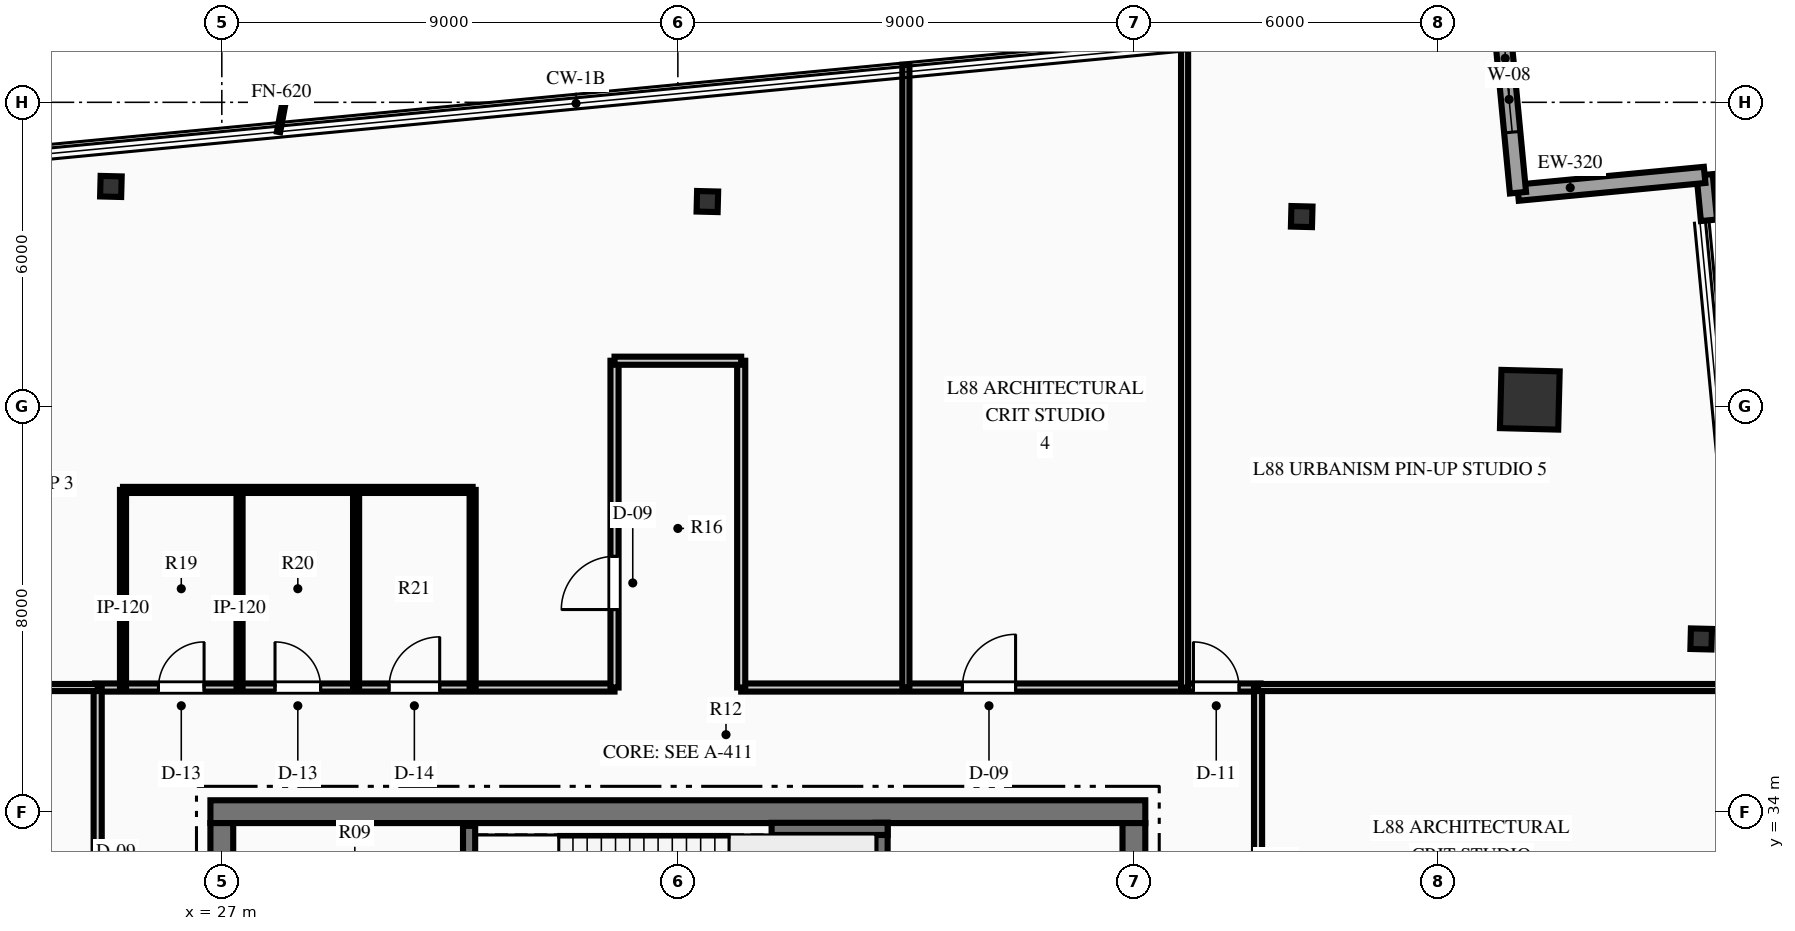
"""IFC4 building model, lengths in metres.
Left out: names, types, materials, properties, quantities, classifications, styles, units other than length and angle.
Written with IfcOpenShell. Run it as: python <this file> out.ifc"""

import sys

from ifc_helpers import new_model, si_unit, direction, frame, frame_2d, origin, origin_2d, place, context, subcontext, project, spatial, rectangle, hollow_rectangle, i_section, extrude, element, fill, save


model = new_model("IFC4")
c1 = context("Model", 3, precision=1e-05, world=origin(), true_north=direction((0.0, 1.0)))
c2 = subcontext(c1, "Body", "Model", "MODEL_VIEW")
j1 = project(units=[si_unit("LENGTHUNIT", "METRE"), si_unit("PLANEANGLEUNIT", "RADIAN")], contexts=[c1])
p1 = place(None, origin())
s1 = spatial("IfcSite", under=j1, at=p1, CompositionType="ELEMENT")
p2 = place(p1, origin())
s2 = spatial("IfcBuilding", under=s1, at=p2, CompositionType="ELEMENT")
p3 = place(p2, frame((0.0, 0.0, 347.7)))
s3 = spatial("IfcBuildingStorey", under=s2, at=p3, CompositionType="ELEMENT", Elevation=347.7)
p4 = place(p3, frame((26.775, 34.0, 0.0), z_axis=(0.0, 0.0, 1.0), x_axis=(1.0, 0.0, 0.0)))
e1 = element("IfcWall", 1, at=p4, inside=s3, PredefinedType="SHEAR", context=c2, shape_type="SweptSolid", body=[
    extrude(rectangle(XDim=18.45, YDim=0.45, at=frame_2d((9.225, 0.0))), origin(), (0.0, 0.0, 1.0), 4.5),
])
p5 = place(p3, frame((27.0, 18.225, 0.0), z_axis=(0.0, 0.0, 1.0), x_axis=(0.0, 1.0, 0.0)))
e2 = element("IfcWall", 2, at=p5, inside=s3, PredefinedType="SHEAR", context=c2, shape_type="SweptSolid", body=[
    extrude(rectangle(XDim=15.55, YDim=0.45, at=frame_2d((7.775, 0.0))), origin(), (0.0, 0.0, 1.0), 4.5),
])
p6 = place(p5, frame((10.015, 0.0, 0.0)))
e3 = element("IfcOpeningElement", 3, at=p6, cuts=e2, PredefinedType="OPENING", context=c2, shape_type="SweptSolid", body=[
    extrude(rectangle(XDim=1.4, YDim=2.2, at=frame_2d((0.7, 1.1))), frame((0.0, 0.235, 0.0), z_axis=(0.0, -1.0, 0.0), x_axis=(1.0, 0.0, 0.0)), (0.0, 0.0, 1.0), 0.47),
])
p7 = place(p3, frame((45.0, 18.225, 0.0), z_axis=(0.0, 0.0, 1.0), x_axis=(0.0, 1.0, 0.0)))
e4 = element("IfcWall", 4, at=p7, inside=s3, PredefinedType="SHEAR", context=c2, shape_type="SweptSolid", body=[
    extrude(rectangle(XDim=15.55, YDim=0.45, at=frame_2d((7.775, 0.0))), origin(), (0.0, 0.0, 1.0), 4.5),
])
p8 = place(p7, frame((10.015, 0.0, 0.0)))
e5 = element("IfcOpeningElement", 5, at=p8, cuts=e4, PredefinedType="OPENING", context=c2, shape_type="SweptSolid", body=[
    extrude(rectangle(XDim=1.4, YDim=2.2, at=frame_2d((0.7, 1.1))), frame((0.0, 0.235, 0.0), z_axis=(0.0, -1.0, 0.0), x_axis=(1.0, 0.0, 0.0)), (0.0, 0.0, 1.0), 0.47),
])
p9 = place(p3, frame((31.88, 29.93, 0.0), z_axis=(0.0, 0.0, 1.0), x_axis=(0.0, 1.0, 0.0)))
e6 = element("IfcWall", 6, at=p9, inside=s3, PredefinedType="SHEAR", context=c2, shape_type="SweptSolid", body=[
    extrude(rectangle(XDim=3.79, YDim=0.24, at=frame_2d((1.895, 0.0))), origin(), (0.0, 0.0, 1.0), 4.5),
])
p10 = place(p3, frame((40.02, 29.93, 0.0), z_axis=(0.0, 0.0, 1.0), x_axis=(0.0, 1.0, 0.0)))
e7 = element("IfcWall", 7, at=p10, inside=s3, PredefinedType="SHEAR", context=c2, shape_type="SweptSolid", body=[
    extrude(rectangle(XDim=3.85, YDim=0.24, at=frame_2d((1.925, 0.0))), origin(), (0.0, 0.0, 1.0), 4.5),
])
p11 = place(p3, frame((37.85, 33.66, 0.0), z_axis=(0.0, 0.0, 1.0), x_axis=(1.0, 0.0, 0.0)))
e8 = element("IfcWall", 8, at=p11, inside=s3, PredefinedType="SHEAR", context=c2, shape_type="SweptSolid", body=[
    extrude(rectangle(XDim=2.29, YDim=0.24, at=frame_2d((1.145, 0.0))), origin(), (0.0, 0.0, 1.0), 4.5),
])
p12 = place(p3, frame((52.813, 42.13, 0.0), z_axis=(0.0, 0.0, 1.0), x_axis=(0.025304572866, 0.999679788028, 0.0)))
e9 = element("IfcColumn", 9, at=p12, inside=s3, PredefinedType="COLUMN", context=c2, shape_type="SweptSolid", body=[
    extrude(hollow_rectangle(XDim=1.15, YDim=1.15, WallThickness=0.05, at=origin_2d()), origin(), (0.0, 0.0, 1.0), 4.5),
])
for number, where, z_axis, x_axis in (
    (10, (56.195, 37.409, 0.0), (0.0, 0.0, 1.0), (0.025, 1.0, 0.0)),
    (11, (48.312, 45.745, 0.0), (0.0, 0.0, 1.0), (0.025, 1.0, 0.0)),
    (12, (36.582, 46.042, 0.0), (0.0, 0.0, 1.0), (0.025, 1.0, 0.0)),
    (13, (24.811, 46.34, 0.0), (0.0, 0.0, 1.0), (0.025, 1.0, 0.0)),
):
    element("IfcColumn", number, at=place(p3, frame(where, z_axis=z_axis, x_axis=x_axis)), inside=s3, PredefinedType="COLUMN", context=c2, shape_type="SweptSolid", body=[
        extrude(i_section(OverallWidth=0.406, OverallDepth=0.416, WebThickness=0.03, FlangeThickness=0.048, at=origin_2d()), origin(), (0.0, 0.0, 1.0), 4.5),
    ])
p13 = place(p3, frame((56.263, 46.567, 0.0), z_axis=(0.0, 0.0, 1.0), x_axis=(0.094962739077, -0.995480827634, 0.0)))
e14 = element("IfcWall", 14, at=p13, inside=s3, PredefinedType="STANDARD", context=c2, shape_type="SweptSolid", body=[
    extrude(rectangle(XDim=0.9, YDim=0.32, at=frame_2d((0.45, 0.0))), origin(), (0.0, 0.0, 1.0), 4.1),
])
p14 = place(p3, frame((52.58, 46.216, 0.0), z_axis=(0.0, 0.0, 1.0), x_axis=(0.995482117902, 0.094949212412, 0.0)))
e15 = element("IfcWall", 15, at=p14, inside=s3, PredefinedType="STANDARD", context=c2, shape_type="SweptSolid", body=[
    extrude(rectangle(XDim=3.7, YDim=0.32, at=frame_2d((1.85, 0.0))), origin(), (0.0, 0.0, 1.0), 4.1),
])
p15 = place(p3, frame((52.229, 49.899, 0.0), z_axis=(0.0, 0.0, 1.0), x_axis=(0.094949212412, -0.995482117902, 0.0)))
e16 = element("IfcWall", 16, at=p15, inside=s3, PredefinedType="STANDARD", context=c2, shape_type="SweptSolid", body=[
    extrude(rectangle(XDim=3.7, YDim=0.32, at=frame_2d((1.85, 0.0))), origin(), (0.0, 0.0, 1.0), 4.1),
])
p16 = place(p15, frame((1.2, 0.0, 0.85)))
e17 = element("IfcOpeningElement", 17, at=p16, cuts=e16, PredefinedType="OPENING", context=c2, shape_type="SweptSolid", body=[
    extrude(rectangle(XDim=1.3, YDim=1.9, at=frame_2d((0.65, 0.95))), frame((0.0, 0.17, 0.0), z_axis=(0.0, -1.0, 0.0), x_axis=(1.0, 0.0, 0.0)), (0.0, 0.0, 1.0), 0.34),
])
p17 = place(p3, frame((24.5, 36.45, 0.0), z_axis=(0.0, 0.0, 1.0), x_axis=(1.0, 0.0, 0.0)))
e18 = element("IfcWall", 18, at=p17, inside=s3, PredefinedType="PARTITIONING", context=c2, shape_type="SweptSolid", body=[
    extrude(rectangle(XDim=10.25, YDim=0.16, at=frame_2d((5.125, 0.0))), origin(), (0.0, 0.0, 1.0), 4.1),
])
p18 = place(p17, frame((1.25, 0.0, 0.0)))
e19 = element("IfcOpeningElement", 19, at=p18, cuts=e18, PredefinedType="OPENING", context=c2, shape_type="SweptSolid", body=[
    extrude(rectangle(XDim=0.9, YDim=2.15, at=frame_2d((0.45, 1.075))), frame((0.0, 0.09, 0.0), z_axis=(0.0, -1.0, 0.0), x_axis=(1.0, 0.0, 0.0)), (0.0, 0.0, 1.0), 0.18),
])
p19 = place(p17, frame((3.55, 0.0, 0.0)))
e20 = element("IfcOpeningElement", 20, at=p19, cuts=e18, PredefinedType="OPENING", context=c2, shape_type="SweptSolid", body=[
    extrude(rectangle(XDim=0.9, YDim=2.15, at=frame_2d((0.45, 1.075))), frame((0.0, 0.09, 0.0), z_axis=(0.0, -1.0, 0.0), x_axis=(1.0, 0.0, 0.0)), (0.0, 0.0, 1.0), 0.18),
])
p20 = place(p17, frame((5.8, 0.0, 0.0)))
e21 = element("IfcOpeningElement", 21, at=p20, cuts=e18, PredefinedType="OPENING", context=c2, shape_type="SweptSolid", body=[
    extrude(rectangle(XDim=1.0, YDim=2.15, at=frame_2d((0.5, 1.075))), frame((0.0, 0.09, 0.0), z_axis=(0.0, -1.0, 0.0), x_axis=(1.0, 0.0, 0.0)), (0.0, 0.0, 1.0), 0.18),
])
p21 = place(p3, frame((37.25, 36.45, 0.0), z_axis=(0.0, 0.0, 1.0), x_axis=(1.0, 0.0, 0.0)))
e22 = element("IfcWall", 22, at=p21, inside=s3, PredefinedType="PARTITIONING", context=c2, shape_type="SweptSolid", body=[
    extrude(rectangle(XDim=10.25, YDim=0.16, at=frame_2d((5.125, 0.0))), origin(), (0.0, 0.0, 1.0), 4.1),
])
p22 = place(p21, frame((4.365, 0.0, 0.0)))
e23 = element("IfcOpeningElement", 23, at=p22, cuts=e22, PredefinedType="OPENING", context=c2, shape_type="SweptSolid", body=[
    extrude(rectangle(XDim=1.05, YDim=2.15, at=frame_2d((0.525, 1.075))), frame((0.0, 0.09, 0.0), z_axis=(0.0, -1.0, 0.0), x_axis=(1.0, 0.0, 0.0)), (0.0, 0.0, 1.0), 0.18),
])
p23 = place(p21, frame((8.925, 0.0, 0.0)))
e24 = element("IfcOpeningElement", 24, at=p23, cuts=e22, PredefinedType="OPENING", context=c2, shape_type="SweptSolid", body=[
    extrude(rectangle(XDim=0.9, YDim=2.15, at=frame_2d((0.45, 1.075))), frame((0.0, 0.09, 0.0), z_axis=(0.0, -1.0, 0.0), x_axis=(1.0, 0.0, 0.0)), (0.0, 0.0, 1.0), 0.18),
])
p24 = place(p3, frame((24.55, 27.25, 0.0), z_axis=(0.0, 0.0, 1.0), x_axis=(0.0, 1.0, 0.0)))
e25 = element("IfcWall", 25, at=p24, inside=s3, PredefinedType="PARTITIONING", context=c2, shape_type="SweptSolid", body=[
    extrude(rectangle(XDim=9.2, YDim=0.16, at=frame_2d((4.6, 0.0))), origin(), (0.0, 0.0, 1.0), 4.1),
])
p25 = place(p24, frame((4.075, 0.0, 0.0)))
e26 = element("IfcOpeningElement", 26, at=p25, cuts=e25, PredefinedType="OPENING", context=c2, shape_type="SweptSolid", body=[
    extrude(rectangle(XDim=1.05, YDim=2.15, at=frame_2d((0.525, 1.075))), frame((0.0, 0.09, 0.0), z_axis=(0.0, -1.0, 0.0), x_axis=(1.0, 0.0, 0.0)), (0.0, 0.0, 1.0), 0.18),
])
p26 = place(p3, frame((47.45, 27.25, 0.0), z_axis=(0.0, 0.0, 1.0), x_axis=(0.0, 1.0, 0.0)))
e27 = element("IfcWall", 27, at=p26, inside=s3, PredefinedType="PARTITIONING", context=c2, shape_type="SweptSolid", body=[
    extrude(rectangle(XDim=9.2, YDim=0.16, at=frame_2d((4.6, 0.0))), origin(), (0.0, 0.0, 1.0), 4.1),
])
p27 = place(p26, frame((3.927, 0.0, 0.0)))
e28 = element("IfcOpeningElement", 28, at=p27, cuts=e27, PredefinedType="OPENING", context=c2, shape_type="SweptSolid", body=[
    extrude(rectangle(XDim=1.05, YDim=2.15, at=frame_2d((0.525, 1.075))), frame((0.0, 0.09, 0.0), z_axis=(0.0, -1.0, 0.0), x_axis=(1.0, 0.0, 0.0)), (0.0, 0.0, 1.0), 0.18),
])
p28 = place(p3, frame((34.75, 36.45, 0.0), z_axis=(0.0, 0.0, 1.0), x_axis=(0.0, 1.0, 0.0)))
e29 = element("IfcWall", 29, at=p28, inside=s3, PredefinedType="PARTITIONING", context=c2, shape_type="SweptSolid", body=[
    extrude(rectangle(XDim=6.45, YDim=0.16, at=frame_2d((3.225, 0.0))), origin(), (0.0, 0.0, 1.0), 4.1),
])
p29 = place(p28, frame((1.539, 0.0, 0.0)))
e30 = element("IfcOpeningElement", 30, at=p29, cuts=e29, PredefinedType="OPENING", context=c2, shape_type="SweptSolid", body=[
    extrude(rectangle(XDim=1.05, YDim=2.15, at=frame_2d((0.525, 1.075))), frame((0.0, 0.09, 0.0), z_axis=(0.0, -1.0, 0.0), x_axis=(1.0, 0.0, 0.0)), (0.0, 0.0, 1.0), 0.18),
])
p30 = place(p3, frame((37.25, 36.45, 0.0), z_axis=(0.0, 0.0, 1.0), x_axis=(0.0, 1.0, 0.0)))
e31 = element("IfcWall", 31, at=p30, inside=s3, PredefinedType="PARTITIONING", context=c2, shape_type="SweptSolid", body=[
    extrude(rectangle(XDim=6.45, YDim=0.16, at=frame_2d((3.225, 0.0))), origin(), (0.0, 0.0, 1.0), 4.1),
])
p31 = place(p3, frame((34.75, 42.9, 0.0), z_axis=(0.0, 0.0, 1.0), x_axis=(1.0, 0.0, 0.0)))
e32 = element("IfcWall", 32, at=p31, inside=s3, PredefinedType="PARTITIONING", context=c2, shape_type="SweptSolid", body=[
    extrude(rectangle(XDim=2.5, YDim=0.16, at=frame_2d((1.25, 0.0))), origin(), (0.0, 0.0, 1.0), 4.1),
])
for number, where, z_axis, x_axis in (
    (33, (25.05, 36.45, 0.0), (0.0, 0.0, 1.0), (0.0, 1.0, 0.0)),
    (34, (27.35, 36.45, 0.0), (0.0, 0.0, 1.0), (0.0, 1.0, 0.0)),
    (35, (29.65, 36.45, 0.0), (0.0, 0.0, 1.0), (0.0, 1.0, 0.0)),
    (36, (31.95, 36.45, 0.0), (0.0, 0.0, 1.0), (0.0, 1.0, 0.0)),
):
    element("IfcWall", number, at=place(p3, frame(where, z_axis=z_axis, x_axis=x_axis)), inside=s3, PredefinedType="PARTITIONING", context=c2, shape_type="SweptSolid", body=[
        extrude(rectangle(XDim=3.9, YDim=0.12, at=frame_2d((1.95, 0.0))), origin(), (0.0, 0.0, 1.0), 4.1),
    ])
p32 = place(p3, frame((25.05, 40.35, 0.0), z_axis=(0.0, 0.0, 1.0), x_axis=(1.0, 0.0, 0.0)))
e37 = element("IfcWall", 37, at=p32, inside=s3, PredefinedType="PARTITIONING", context=c2, shape_type="SweptSolid", body=[
    extrude(rectangle(XDim=6.9, YDim=0.12, at=frame_2d((3.45, 0.0))), origin(), (0.0, 0.0, 1.0), 4.1),
])
p33 = place(p3, frame((12.993, 36.45, 0.0), z_axis=(0.0, 0.0, 1.0), x_axis=(1.0, 0.0, 0.0)))
e38 = element("IfcWall", 38, at=p33, inside=s3, PredefinedType="PARTITIONING", context=c2, shape_type="SweptSolid", body=[
    extrude(rectangle(XDim=11.557, YDim=0.14, at=frame_2d((5.778, 0.0))), origin(), (0.0, 0.0, 1.0), 3.689),
])
p34 = place(p3, frame((47.45, 36.45, 0.0), z_axis=(0.0, 0.0, 1.0), x_axis=(1.0, 0.0, 0.0)))
e39 = element("IfcWall", 39, at=p34, inside=s3, PredefinedType="PARTITIONING", context=c2, shape_type="SweptSolid", body=[
    extrude(rectangle(XDim=9.738, YDim=0.14, at=frame_2d((4.869, 0.0))), origin(), (0.0, 0.0, 1.0), 3.478),
])
p35 = place(p3, frame((40.5, 36.45, 0.0), z_axis=(0.0, 0.0, 1.0), x_axis=(0.0, 1.0, 0.0)))
e40 = element("IfcWall", 40, at=p35, inside=s3, PredefinedType="PARTITIONING", context=c2, shape_type="SweptSolid", body=[
    extrude(rectangle(XDim=12.29, YDim=0.14, at=frame_2d((6.145, 0.0))), origin(), (0.0, 0.0, 1.0), 4.1),
])
p36 = place(p3, frame((46.0, 36.45, 0.0), z_axis=(0.0, 0.0, 1.0), x_axis=(0.0, 1.0, 0.0)))
e41 = element("IfcWall", 41, at=p36, inside=s3, PredefinedType="PARTITIONING", context=c2, shape_type="SweptSolid", body=[
    extrude(rectangle(XDim=12.815, YDim=0.14, at=frame_2d((6.407, 0.0))), origin(), (0.0, 0.0, 1.0), 3.689),
])
p37 = place(p16, origin())
e42 = element("IfcWindow", 42, at=p37, inside=s3, PartitioningType="SINGLE_PANEL", PredefinedType="WINDOW", context=c2, shape_type="SweptSolid", body=[
    extrude(rectangle(XDim=1.3, YDim=1.9, at=frame_2d((0.65, 0.95))), frame((0.0, 0.03, 0.0), z_axis=(0.0, -1.0, 0.0), x_axis=(1.0, 0.0, 0.0)), (0.0, 0.0, 1.0), 0.06),
])
fill(e17, e42)
p38 = place(p18, origin())
e43 = element("IfcDoor", 43, at=p38, inside=s3, OperationType="SINGLE_SWING_RIGHT", PredefinedType="DOOR", context=c2, shape_type="SweptSolid", body=[
    extrude(rectangle(XDim=0.9, YDim=2.15, at=frame_2d((0.45, 1.075))), frame((0.0, 0.025, 0.0), z_axis=(0.0, -1.0, 0.0), x_axis=(1.0, 0.0, 0.0)), (0.0, 0.0, 1.0), 0.05),
])
fill(e19, e43)
p39 = place(p19, origin())
e44 = element("IfcDoor", 44, at=p39, inside=s3, OperationType="SINGLE_SWING_LEFT", PredefinedType="DOOR", context=c2, shape_type="SweptSolid", body=[
    extrude(rectangle(XDim=0.9, YDim=2.15, at=frame_2d((0.45, 1.075))), frame((0.0, 0.025, 0.0), z_axis=(0.0, -1.0, 0.0), x_axis=(1.0, 0.0, 0.0)), (0.0, 0.0, 1.0), 0.05),
])
fill(e20, e44)
p40 = place(p20, origin())
e45 = element("IfcDoor", 45, at=p40, inside=s3, OperationType="SINGLE_SWING_RIGHT", PredefinedType="DOOR", context=c2, shape_type="SweptSolid", body=[
    extrude(rectangle(XDim=1.0, YDim=2.15, at=frame_2d((0.5, 1.075))), frame((0.0, 0.025, 0.0), z_axis=(0.0, -1.0, 0.0), x_axis=(1.0, 0.0, 0.0)), (0.0, 0.0, 1.0), 0.05),
])
fill(e21, e45)
p41 = place(p29, origin())
e46 = element("IfcDoor", 46, at=p41, inside=s3, OperationType="SINGLE_SWING_LEFT", PredefinedType="DOOR", context=c2, shape_type="SweptSolid", body=[
    extrude(rectangle(XDim=1.05, YDim=2.15, at=frame_2d((0.525, 1.075))), frame((0.0, 0.025, 0.0), z_axis=(0.0, -1.0, 0.0), x_axis=(1.0, 0.0, 0.0)), (0.0, 0.0, 1.0), 0.05),
])
fill(e30, e46)
p42 = place(p22, origin())
e47 = element("IfcDoor", 47, at=p42, inside=s3, OperationType="SINGLE_SWING_RIGHT", PredefinedType="DOOR", context=c2, shape_type="SweptSolid", body=[
    extrude(rectangle(XDim=1.05, YDim=2.15, at=frame_2d((0.525, 1.075))), frame((0.0, 0.025, 0.0), z_axis=(0.0, -1.0, 0.0), x_axis=(1.0, 0.0, 0.0)), (0.0, 0.0, 1.0), 0.05),
])
fill(e23, e47)
p43 = place(p23, origin())
e48 = element("IfcDoor", 48, at=p43, inside=s3, OperationType="SINGLE_SWING_LEFT", PredefinedType="DOOR", context=c2, shape_type="SweptSolid", body=[
    extrude(rectangle(XDim=0.9, YDim=2.15, at=frame_2d((0.45, 1.075))), frame((0.0, 0.025, 0.0), z_axis=(0.0, -1.0, 0.0), x_axis=(1.0, 0.0, 0.0)), (0.0, 0.0, 1.0), 0.05),
])
fill(e24, e48)
save(model, sys.argv[1])
